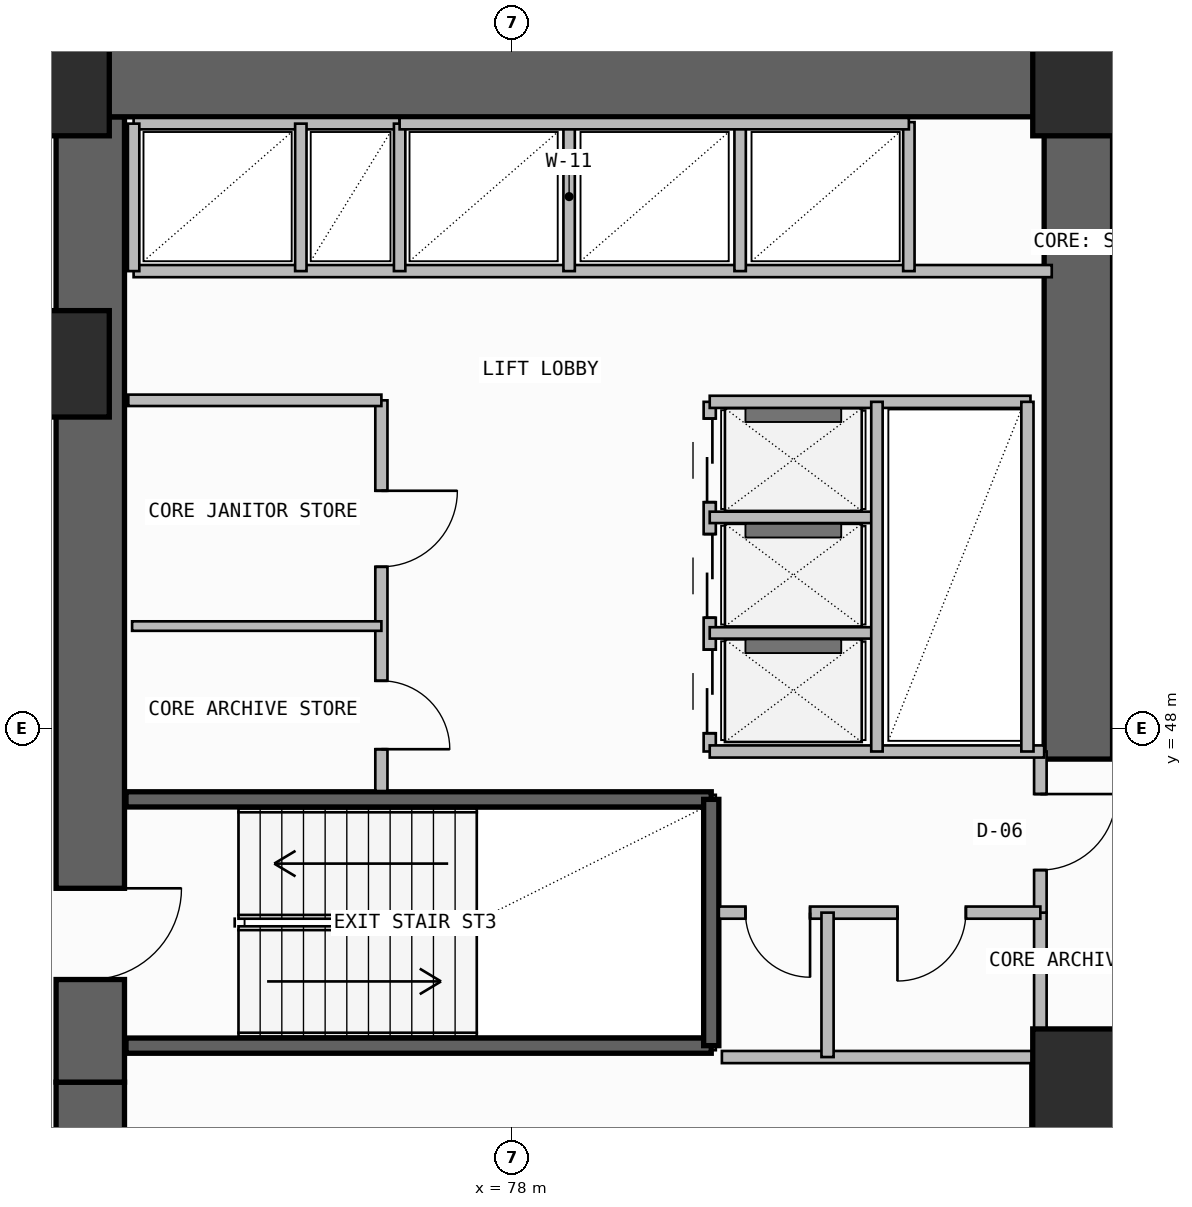
"""IFC4 building model, lengths in metres.
Left out: names, types, materials, properties, quantities, classifications, styles, units other than length and angle.
Written with IfcOpenShell. Run it as: python <this file> out.ifc"""

import sys

from ifc_helpers import new_model, si_unit, direction, frame, frame_2d, origin, origin_2d, place, context, subcontext, project, spatial, rectangle, extrude, element, fill, save


model = new_model("IFC4")
c1 = context("Model", 3, precision=1e-05, world=origin(), true_north=direction((0.0, 1.0)))
c2 = subcontext(c1, "Body", "Model", "MODEL_VIEW")
j1 = project(units=[si_unit("LENGTHUNIT", "METRE"), si_unit("PLANEANGLEUNIT", "RADIAN")], contexts=[c1])
p1 = place(None, origin())
s1 = spatial("IfcSite", under=j1, at=p1, CompositionType="ELEMENT")
p2 = place(p1, origin())
s2 = spatial("IfcBuilding", under=s1, at=p2, CompositionType="ELEMENT")
p3 = place(p2, frame((0.0, 0.0, 128.1)))
s3 = spatial("IfcBuildingStorey", under=s2, at=p3, CompositionType="ELEMENT", Elevation=128.1)
p4 = place(p3, frame((72.45, 35.5, -0.5), z_axis=(0.0, 0.0, 1.0), x_axis=(0.0, 1.0, 0.0)))
e1 = element("IfcWall", 1, at=p4, inside=s3, PredefinedType="SHEAR", context=c2, shape_type="SweptSolid", body=[
    extrude(rectangle(XDim=7.85, YDim=0.9, at=frame_2d((3.925, 0.0))), origin(), (0.0, 0.0, 1.0), 4.3),
])
p5 = place(p4, frame((1.45, 0.0, 0.5)))
e2 = element("IfcOpeningElement", 2, at=p5, cuts=e1, PredefinedType="OPENING", context=c2, shape_type="SweptSolid", body=[
    extrude(rectangle(XDim=1.2, YDim=2.2, at=frame_2d((0.6, 1.1))), frame((0.0, 0.46, 0.0), z_axis=(0.0, -1.0, 0.0), x_axis=(1.0, 0.0, 0.0)), (0.0, 0.0, 1.0), 0.92),
])
p6 = place(p3, frame((72.45, 43.35, -0.5), z_axis=(0.0, 0.0, 1.0), x_axis=(0.0, 1.0, 0.0)))
e3 = element("IfcWall", 3, at=p6, inside=s3, PredefinedType="SHEAR", context=c2, shape_type="SweptSolid", body=[
    extrude(rectangle(XDim=12.7, YDim=0.9, at=frame_2d((6.35, 0.0))), origin(), (0.0, 0.0, 1.0), 4.3),
])
p7 = place(p6, frame((1.35, 0.0, 0.5)))
e4 = element("IfcOpeningElement", 4, at=p7, cuts=e3, PredefinedType="OPENING", context=c2, shape_type="SweptSolid", body=[
    extrude(rectangle(XDim=1.2, YDim=2.2, at=frame_2d((0.6, 1.1))), frame((0.0, 0.46, 0.0), z_axis=(0.0, -1.0, 0.0), x_axis=(1.0, 0.0, 0.0)), (0.0, 0.0, 1.0), 0.92),
])
p8 = place(p3, frame((72.0, 56.5, -0.5), z_axis=(0.0, 0.0, 1.0), x_axis=(1.0, 0.0, 0.0)))
e5 = element("IfcWall", 5, at=p8, inside=s3, PredefinedType="SHEAR", context=c2, shape_type="SweptSolid", body=[
    extrude(rectangle(XDim=13.9, YDim=0.9, at=frame_2d((6.95, 0.0))), origin(), (0.0, 0.0, 1.0), 4.3),
])
p9 = place(p3, frame((85.45, 47.6, -0.5), z_axis=(0.0, 0.0, 1.0), x_axis=(0.0, 1.0, 0.0)))
e6 = element("IfcWall", 6, at=p9, inside=s3, PredefinedType="SHEAR", context=c2, shape_type="SweptSolid", body=[
    extrude(rectangle(XDim=8.45, YDim=0.9, at=frame_2d((4.225, 0.0))), origin(), (0.0, 0.0, 1.0), 4.3),
])
for number, where, z_axis, x_axis in (
    (7, (85.55, 43.35, 0.0), (0.0, 0.0, 1.0), (1.0, 0.0, 0.0)),
    (8, (72.0, 52.8, 0.0), (0.0, 0.0, 1.0), (1.0, 0.0, 0.0)),
    (9, (72.0, 56.5, 0.0), (0.0, 0.0, 1.0), (1.0, 0.0, 0.0)),
    (10, (85.55, 56.5, 0.0), (0.0, 0.0, 1.0), (1.0, 0.0, 0.0)),
):
    element("IfcColumn", number, at=place(p3, frame(where, z_axis=z_axis, x_axis=x_axis)), inside=s3, PredefinedType="COLUMN", context=c2, shape_type="SweptSolid", body=[
        extrude(rectangle(XDim=1.4, YDim=1.4, at=origin_2d()), origin(), (0.0, 0.0, 1.0), 4.2),
    ])
p10 = place(p3, frame((84.92, 38.85, 0.0), z_axis=(0.0, 0.0, 1.0), x_axis=(0.0, 1.0, 0.0)))
e11 = element("IfcWall", 11, at=p10, inside=s3, PredefinedType="SOLIDWALL", context=c2, shape_type="SweptSolid", body=[
    extrude(rectangle(XDim=4.83, YDim=0.2, at=frame_2d((2.415, 0.0))), origin(), (0.0, 0.0, 1.0), 3.8),
])
p11 = place(p10, frame((1.25, 0.0, 0.0)))
e12 = element("IfcOpeningElement", 12, at=p11, cuts=e11, PredefinedType="OPENING", context=c2, shape_type="SweptSolid", body=[
    extrude(rectangle(XDim=1.1, YDim=2.2, at=frame_2d((0.55, 1.1))), frame((0.0, 0.11, 0.0), z_axis=(0.0, -1.0, 0.0), x_axis=(1.0, 0.0, 0.0)), (0.0, 0.0, 1.0), 0.22),
])
for number, where, z_axis, x_axis in (
    (13, (72.92, 43.83, -0.5), (0.0, 0.0, 1.0), (1.0, 0.0, 0.0)),
    (14, (72.92, 47.07, -0.5), (0.0, 0.0, 1.0), (1.0, 0.0, 0.0)),
):
    element("IfcWall", number, at=place(p3, frame(where, z_axis=z_axis, x_axis=x_axis)), inside=s3, PredefinedType="SOLIDWALL", context=c2, shape_type="SweptSolid", body=[
        extrude(rectangle(XDim=7.7, YDim=0.2, at=frame_2d((3.85, 0.0))), origin(), (0.0, 0.0, 1.0), 4.3),
    ])
p12 = place(p3, frame((80.62, 43.83, -0.5), z_axis=(0.0, 0.0, 1.0), x_axis=(0.0, 1.0, 0.0)))
e15 = element("IfcWall", 15, at=p12, inside=s3, PredefinedType="SOLIDWALL", context=c2, shape_type="SweptSolid", body=[
    extrude(rectangle(XDim=3.24, YDim=0.2, at=frame_2d((1.62, 0.0))), origin(), (0.0, 0.0, 1.0), 4.3),
])
p13 = place(p3, frame((84.95, 43.68, 0.0), z_axis=(0.0, 0.0, 1.0), x_axis=(0.0, 1.0, 0.0)))
e16 = element("IfcWall", 16, at=p13, inside=s3, PredefinedType="PLUMBINGWALL", context=c2, shape_type="SweptSolid", body=[
    extrude(rectangle(XDim=1.9, YDim=0.165, at=frame_2d((0.95, 0.0))), origin(), (0.0, 0.0, 1.0), 3.8),
])
p14 = place(p3, frame((84.95, 45.58, 0.0), z_axis=(0.0, 0.0, 1.0), x_axis=(0.0, 1.0, 0.0)))
e17 = element("IfcWall", 17, at=p14, inside=s3, PredefinedType="PARTITIONING", context=c2, shape_type="SweptSolid", body=[
    extrude(rectangle(XDim=2.12, YDim=0.165, at=frame_2d((1.06, 0.0))), origin(), (0.0, 0.0, 1.0), 3.8),
])
p15 = place(p14, frame((0.56, 0.0, 0.0)))
e18 = element("IfcOpeningElement", 18, at=p15, cuts=e17, PredefinedType="OPENING", context=c2, shape_type="SweptSolid", body=[
    extrude(rectangle(XDim=1.0, YDim=2.2, at=frame_2d((0.5, 1.1))), frame((0.0, 0.093, 0.0), z_axis=(0.0, -1.0, 0.0), x_axis=(1.0, 0.0, 0.0)), (0.0, 0.0, 1.0), 0.185),
])
p16 = place(p3, frame((80.72, 45.58, 0.0), z_axis=(0.0, 0.0, 1.0), x_axis=(1.0, 0.0, 0.0)))
e19 = element("IfcWall", 19, at=p16, inside=s3, PredefinedType="PLUMBINGWALL", context=c2, shape_type="SweptSolid", body=[
    extrude(rectangle(XDim=4.23, YDim=0.16, at=frame_2d((2.115, 0.0))), origin(), (0.0, 0.0, 1.0), 3.8),
])
p17 = place(p16, frame((0.35, 0.0, 0.0)))
e20 = element("IfcOpeningElement", 20, at=p17, cuts=e19, PredefinedType="OPENING", context=c2, shape_type="SweptSolid", body=[
    extrude(rectangle(XDim=0.85, YDim=2.05, at=frame_2d((0.425, 1.025))), frame((0.0, 0.09, 0.0), z_axis=(0.0, -1.0, 0.0), x_axis=(1.0, 0.0, 0.0)), (0.0, 0.0, 1.0), 0.18),
])
p18 = place(p16, frame((2.35, 0.0, 0.0)))
e21 = element("IfcOpeningElement", 21, at=p18, cuts=e19, PredefinedType="OPENING", context=c2, shape_type="SweptSolid", body=[
    extrude(rectangle(XDim=0.9, YDim=2.1, at=frame_2d((0.45, 1.05))), frame((0.0, 0.09, 0.0), z_axis=(0.0, -1.0, 0.0), x_axis=(1.0, 0.0, 0.0)), (0.0, 0.0, 1.0), 0.18),
])
p19 = place(p3, frame((80.76, 43.68, 0.0), z_axis=(0.0, 0.0, 1.0), x_axis=(1.0, 0.0, 0.0)))
e22 = element("IfcWall", 22, at=p19, inside=s3, PredefinedType="PLUMBINGWALL", context=c2, shape_type="SweptSolid", body=[
    extrude(rectangle(XDim=4.19, YDim=0.16, at=frame_2d((2.095, 0.0))), origin(), (0.0, 0.0, 1.0), 3.8),
])
p20 = place(p3, frame((82.15, 43.68, 0.0), z_axis=(0.0, 0.0, 1.0), x_axis=(0.0, 1.0, 0.0)))
e23 = element("IfcWall", 23, at=p20, inside=s3, PredefinedType="PLUMBINGWALL", context=c2, shape_type="SweptSolid", body=[
    extrude(rectangle(XDim=1.9, YDim=0.16, at=frame_2d((0.95, 0.0))), origin(), (0.0, 0.0, 1.0), 3.8),
])
p21 = place(p3, frame((76.28, 47.18, 0.0), z_axis=(0.0, 0.0, 1.0), x_axis=(0.0, 1.0, 0.0)))
e24 = element("IfcWall", 24, at=p21, inside=s3, PredefinedType="SOLIDWALL", context=c2, shape_type="SweptSolid", body=[
    extrude(rectangle(XDim=5.14, YDim=0.16, at=frame_2d((2.57, 0.0))), origin(), (0.0, 0.0, 1.0), 3.8),
])
p22 = place(p21, frame((0.55, 0.0, 0.0)))
e25 = element("IfcOpeningElement", 25, at=p22, cuts=e24, PredefinedType="OPENING", context=c2, shape_type="SweptSolid", body=[
    extrude(rectangle(XDim=0.9, YDim=2.1, at=frame_2d((0.45, 1.05))), frame((0.0, 0.09, 0.0), z_axis=(0.0, -1.0, 0.0), x_axis=(1.0, 0.0, 0.0)), (0.0, 0.0, 1.0), 0.18),
])
p23 = place(p21, frame((2.95, 0.0, 0.0)))
e26 = element("IfcOpeningElement", 26, at=p23, cuts=e24, PredefinedType="OPENING", context=c2, shape_type="SweptSolid", body=[
    extrude(rectangle(XDim=1.0, YDim=2.2, at=frame_2d((0.5, 1.1))), frame((0.0, 0.09, 0.0), z_axis=(0.0, -1.0, 0.0), x_axis=(1.0, 0.0, 0.0)), (0.0, 0.0, 1.0), 0.18),
])
p24 = place(p3, frame((72.95, 52.32, 0.0), z_axis=(0.0, 0.0, 1.0), x_axis=(1.0, 0.0, 0.0)))
e27 = element("IfcWall", 27, at=p24, inside=s3, PredefinedType="SOLIDWALL", context=c2, shape_type="SweptSolid", body=[
    extrude(rectangle(XDim=3.33, YDim=0.15, at=frame_2d((1.665, 0.0))), origin(), (0.0, 0.0, 1.0), 3.8),
])
p25 = place(p3, frame((73.0, 49.35, 0.0), z_axis=(0.0, 0.0, 1.0), x_axis=(1.0, 0.0, 0.0)))
e28 = element("IfcWall", 28, at=p25, inside=s3, PredefinedType="PARTITIONING", context=c2, shape_type="SweptSolid", body=[
    extrude(rectangle(XDim=3.28, YDim=0.125, at=frame_2d((1.64, 0.0))), origin(), (0.0, 0.0, 1.0), 3.8),
])
p26 = place(p3, frame((80.6, 47.7, 0.0), z_axis=(0.0, 0.0, 1.0), x_axis=(0.0, 1.0, 0.0)))
e29 = element("IfcWall", 29, at=p26, inside=s3, PredefinedType="SOLIDWALL", context=c2, shape_type="SweptSolid", body=[
    extrude(rectangle(XDim=4.6, YDim=0.16, at=frame_2d((2.3, 0.0))), origin(), (0.0, 0.0, 1.0), 3.8),
])
p27 = place(p26, frame((0.24, 0.0, 0.0)))
e30 = element("IfcOpeningElement", 30, at=p27, cuts=e29, PredefinedType="OPENING", context=c2, shape_type="SweptSolid", body=[
    extrude(rectangle(XDim=1.1, YDim=2.25, at=frame_2d((0.55, 1.125))), frame((0.0, 0.09, 0.0), z_axis=(0.0, -1.0, 0.0), x_axis=(1.0, 0.0, 0.0)), (0.0, 0.0, 1.0), 0.18),
])
p28 = place(p26, frame((1.76, 0.0, 0.0)))
e31 = element("IfcOpeningElement", 31, at=p28, cuts=e29, PredefinedType="OPENING", context=c2, shape_type="SweptSolid", body=[
    extrude(rectangle(XDim=1.1, YDim=2.25, at=frame_2d((0.55, 1.125))), frame((0.0, 0.09, 0.0), z_axis=(0.0, -1.0, 0.0), x_axis=(1.0, 0.0, 0.0)), (0.0, 0.0, 1.0), 0.18),
])
p29 = place(p26, frame((3.28, 0.0, 0.0)))
e32 = element("IfcOpeningElement", 32, at=p29, cuts=e29, PredefinedType="OPENING", context=c2, shape_type="SweptSolid", body=[
    extrude(rectangle(XDim=1.1, YDim=2.25, at=frame_2d((0.55, 1.125))), frame((0.0, 0.09, 0.0), z_axis=(0.0, -1.0, 0.0), x_axis=(1.0, 0.0, 0.0)), (0.0, 0.0, 1.0), 0.18),
])
p30 = place(p3, frame((80.6, 47.7, 0.0), z_axis=(0.0, 0.0, 1.0), x_axis=(1.0, 0.0, 0.0)))
e33 = element("IfcWall", 33, at=p30, inside=s3, PredefinedType="SOLIDWALL", context=c2, shape_type="SweptSolid", body=[
    extrude(rectangle(XDim=4.4, YDim=0.16, at=frame_2d((2.2, 0.0))), origin(), (0.0, 0.0, 1.0), 3.8),
])
p31 = place(p3, frame((80.6, 52.3, 0.0), z_axis=(0.0, 0.0, 1.0), x_axis=(1.0, 0.0, 0.0)))
e34 = element("IfcWall", 34, at=p31, inside=s3, PredefinedType="SOLIDWALL", context=c2, shape_type="SweptSolid", body=[
    extrude(rectangle(XDim=4.22, YDim=0.16, at=frame_2d((2.11, 0.0))), origin(), (0.0, 0.0, 1.0), 3.8),
])
for number, where, z_axis, x_axis in (
    (35, (80.6, 49.26, 0.0), (0.0, 0.0, 1.0), (1.0, 0.0, 0.0)),
    (36, (80.6, 50.78, 0.0), (0.0, 0.0, 1.0), (1.0, 0.0, 0.0)),
):
    element("IfcWall", number, at=place(p3, frame(where, z_axis=z_axis, x_axis=x_axis)), inside=s3, PredefinedType="PLUMBINGWALL", context=c2, shape_type="SweptSolid", body=[
        extrude(rectangle(XDim=2.2, YDim=0.15, at=frame_2d((1.1, 0.0))), origin(), (0.0, 0.0, 1.0), 3.8),
    ])
p32 = place(p3, frame((82.8, 47.7, 0.0), z_axis=(0.0, 0.0, 1.0), x_axis=(0.0, 1.0, 0.0)))
e37 = element("IfcWall", 37, at=p32, inside=s3, PredefinedType="PLUMBINGWALL", context=c2, shape_type="SweptSolid", body=[
    extrude(rectangle(XDim=4.6, YDim=0.15, at=frame_2d((2.3, 0.0))), origin(), (0.0, 0.0, 1.0), 3.8),
])
p33 = place(p3, frame((84.78, 47.7, 0.0), z_axis=(0.0, 0.0, 1.0), x_axis=(0.0, 1.0, 0.0)))
e38 = element("IfcWall", 38, at=p33, inside=s3, PredefinedType="SOLIDWALL", context=c2, shape_type="SweptSolid", body=[
    extrude(rectangle(XDim=4.6, YDim=0.16, at=frame_2d((2.3, 0.0))), origin(), (0.0, 0.0, 1.0), 3.8),
])
p34 = place(p3, frame((73.02, 54.02, 0.0), z_axis=(0.0, 0.0, 1.0), x_axis=(1.0, 0.0, 0.0)))
e39 = element("IfcWall", 39, at=p34, inside=s3, PredefinedType="SOLIDWALL", context=c2, shape_type="SweptSolid", body=[
    extrude(rectangle(XDim=12.08, YDim=0.16, at=frame_2d((6.04, 0.0))), origin(), (0.0, 0.0, 1.0), 3.8),
])
p35 = place(p3, frame((73.02, 55.96, 0.0), z_axis=(0.0, 0.0, 1.0), x_axis=(1.0, 0.0, 0.0)))
e40 = element("IfcWall", 40, at=p35, inside=s3, PredefinedType="SOLIDWALL", context=c2, shape_type="SweptSolid", body=[
    extrude(rectangle(XDim=3.5, YDim=0.15, at=frame_2d((1.75, 0.0))), origin(), (0.0, 0.0, 1.0), 3.8),
])
p36 = place(p3, frame((73.02, 54.02, 0.0), z_axis=(0.0, 0.0, 1.0), x_axis=(0.0, 1.0, 0.0)))
e41 = element("IfcWall", 41, at=p36, inside=s3, PredefinedType="PLUMBINGWALL", context=c2, shape_type="SweptSolid", body=[
    extrude(rectangle(XDim=1.94, YDim=0.15, at=frame_2d((0.97, 0.0))), origin(), (0.0, 0.0, 1.0), 3.8),
])
p37 = place(p3, frame((76.52, 54.02, 0.0), z_axis=(0.0, 0.0, 1.0), x_axis=(0.0, 1.0, 0.0)))
e42 = element("IfcWall", 42, at=p37, inside=s3, PredefinedType="SOLIDWALL", context=c2, shape_type="SweptSolid", body=[
    extrude(rectangle(XDim=1.94, YDim=0.15, at=frame_2d((0.97, 0.0))), origin(), (0.0, 0.0, 1.0), 3.8),
])
p38 = place(p3, frame((75.22, 54.02, 0.0), z_axis=(0.0, 0.0, 1.0), x_axis=(0.0, 1.0, 0.0)))
e43 = element("IfcWall", 43, at=p38, inside=s3, PredefinedType="PLUMBINGWALL", context=c2, shape_type="SweptSolid", body=[
    extrude(rectangle(XDim=1.94, YDim=0.15, at=frame_2d((0.97, 0.0))), origin(), (0.0, 0.0, 1.0), 3.8),
])
for number, where, z_axis, x_axis in (
    (44, (78.75, 54.02, 0.0), (0.0, 0.0, 1.0), (0.0, 1.0, 0.0)),
    (45, (81.0, 54.02, 0.0), (0.0, 0.0, 1.0), (0.0, 1.0, 0.0)),
):
    element("IfcWall", number, at=place(p3, frame(where, z_axis=z_axis, x_axis=x_axis)), inside=s3, PredefinedType="PLUMBINGWALL", context=c2, shape_type="SweptSolid", body=[
        extrude(rectangle(XDim=1.96, YDim=0.15, at=frame_2d((0.98, 0.0))), origin(), (0.0, 0.0, 1.0), 3.8),
    ])
p39 = place(p3, frame((83.22, 54.02, 0.0), z_axis=(0.0, 0.0, 1.0), x_axis=(0.0, 1.0, 0.0)))
e46 = element("IfcWall", 46, at=p39, inside=s3, PredefinedType="SOLIDWALL", context=c2, shape_type="SweptSolid", body=[
    extrude(rectangle(XDim=1.96, YDim=0.15, at=frame_2d((0.98, 0.0))), origin(), (0.0, 0.0, 1.0), 3.8),
])
p40 = place(p3, frame((76.52, 55.96, 0.0), z_axis=(0.0, 0.0, 1.0), x_axis=(1.0, 0.0, 0.0)))
e47 = element("IfcWall", 47, at=p40, inside=s3, PredefinedType="SOLIDWALL", context=c2, shape_type="SweptSolid", body=[
    extrude(rectangle(XDim=6.7, YDim=0.15, at=frame_2d((3.35, 0.0))), origin(), (0.0, 0.0, 1.0), 3.8),
])
p41 = place(p7, frame((1.2, 0.0, 0.0), z_axis=(0.0, 0.0, 1.0), x_axis=(-1.0, 0.0, 0.0)))
e48 = element("IfcDoor", 48, at=p41, inside=s3, OperationType="SINGLE_SWING_LEFT", PredefinedType="USERDEFINED", context=c2, shape_type="SweptSolid", body=[
    extrude(rectangle(XDim=1.2, YDim=2.2, at=frame_2d((0.6, 1.1))), frame((0.0, 0.025, 0.0), z_axis=(0.0, -1.0, 0.0), x_axis=(1.0, 0.0, 0.0)), (0.0, 0.0, 1.0), 0.05),
])
fill(e4, e48)
p42 = place(p15, frame((1.0, 0.0, 0.0), z_axis=(0.0, 0.0, 1.0), x_axis=(-1.0, 0.0, 0.0)))
e49 = element("IfcDoor", 49, at=p42, inside=s3, OperationType="SINGLE_SWING_LEFT", PredefinedType="DOOR", context=c2, shape_type="SweptSolid", body=[
    extrude(rectangle(XDim=1.0, YDim=2.2, at=frame_2d((0.5, 1.1))), frame((0.0, 0.025, 0.0), z_axis=(0.0, -1.0, 0.0), x_axis=(1.0, 0.0, 0.0)), (0.0, 0.0, 1.0), 0.05),
])
fill(e18, e49)
p43 = place(p17, frame((0.85, 0.0, 0.0), z_axis=(0.0, 0.0, 1.0), x_axis=(-1.0, 0.0, 0.0)))
e50 = element("IfcDoor", 50, at=p43, inside=s3, OperationType="SINGLE_SWING_LEFT", PredefinedType="DOOR", context=c2, shape_type="SweptSolid", body=[
    extrude(rectangle(XDim=0.85, YDim=2.05, at=frame_2d((0.425, 1.025))), frame((0.0, 0.025, 0.0), z_axis=(0.0, -1.0, 0.0), x_axis=(1.0, 0.0, 0.0)), (0.0, 0.0, 1.0), 0.05),
])
fill(e20, e50)
p44 = place(p18, frame((0.9, 0.0, 0.0), z_axis=(0.0, 0.0, 1.0), x_axis=(-1.0, 0.0, 0.0)))
e51 = element("IfcDoor", 51, at=p44, inside=s3, OperationType="SINGLE_SWING_RIGHT", PredefinedType="DOOR", context=c2, shape_type="SweptSolid", body=[
    extrude(rectangle(XDim=0.9, YDim=2.1, at=frame_2d((0.45, 1.05))), frame((0.0, 0.025, 0.0), z_axis=(0.0, -1.0, 0.0), x_axis=(1.0, 0.0, 0.0)), (0.0, 0.0, 1.0), 0.05),
])
fill(e21, e51)
p45 = place(p22, frame((0.9, 0.0, 0.0), z_axis=(0.0, 0.0, 1.0), x_axis=(-1.0, 0.0, 0.0)))
e52 = element("IfcDoor", 52, at=p45, inside=s3, OperationType="SINGLE_SWING_RIGHT", PredefinedType="DOOR", context=c2, shape_type="SweptSolid", body=[
    extrude(rectangle(XDim=0.9, YDim=2.1, at=frame_2d((0.45, 1.05))), frame((0.0, 0.025, 0.0), z_axis=(0.0, -1.0, 0.0), x_axis=(1.0, 0.0, 0.0)), (0.0, 0.0, 1.0), 0.05),
])
fill(e25, e52)
p46 = place(p23, frame((1.0, 0.0, 0.0), z_axis=(0.0, 0.0, 1.0), x_axis=(-1.0, 0.0, 0.0)))
e53 = element("IfcDoor", 53, at=p46, inside=s3, OperationType="SINGLE_SWING_LEFT", PredefinedType="DOOR", context=c2, shape_type="SweptSolid", body=[
    extrude(rectangle(XDim=1.0, YDim=2.2, at=frame_2d((0.5, 1.1))), frame((0.0, 0.025, 0.0), z_axis=(0.0, -1.0, 0.0), x_axis=(1.0, 0.0, 0.0)), (0.0, 0.0, 1.0), 0.05),
])
fill(e26, e53)
p47 = place(p27, frame((1.1, 0.0, 0.0), z_axis=(0.0, 0.0, 1.0), x_axis=(-1.0, 0.0, 0.0)))
e54 = element("IfcDoor", 54, at=p47, inside=s3, OperationType="DOUBLE_DOOR_SLIDING", PredefinedType="DOOR", context=c2, shape_type="SweptSolid", body=[
    extrude(rectangle(XDim=1.1, YDim=2.25, at=frame_2d((0.55, 1.125))), frame((0.0, 0.025, 0.0), z_axis=(0.0, -1.0, 0.0), x_axis=(1.0, 0.0, 0.0)), (0.0, 0.0, 1.0), 0.05),
])
fill(e30, e54)
p48 = place(p28, frame((1.1, 0.0, 0.0), z_axis=(0.0, 0.0, 1.0), x_axis=(-1.0, 0.0, 0.0)))
e55 = element("IfcDoor", 55, at=p48, inside=s3, OperationType="DOUBLE_DOOR_SLIDING", PredefinedType="DOOR", context=c2, shape_type="SweptSolid", body=[
    extrude(rectangle(XDim=1.1, YDim=2.25, at=frame_2d((0.55, 1.125))), frame((0.0, 0.025, 0.0), z_axis=(0.0, -1.0, 0.0), x_axis=(1.0, 0.0, 0.0)), (0.0, 0.0, 1.0), 0.05),
])
fill(e31, e55)
p49 = place(p29, frame((1.1, 0.0, 0.0), z_axis=(0.0, 0.0, 1.0), x_axis=(-1.0, 0.0, 0.0)))
e56 = element("IfcDoor", 56, at=p49, inside=s3, OperationType="DOUBLE_DOOR_SLIDING", PredefinedType="DOOR", context=c2, shape_type="SweptSolid", body=[
    extrude(rectangle(XDim=1.1, YDim=2.25, at=frame_2d((0.55, 1.125))), frame((0.0, 0.025, 0.0), z_axis=(0.0, -1.0, 0.0), x_axis=(1.0, 0.0, 0.0)), (0.0, 0.0, 1.0), 0.05),
])
fill(e32, e56)
save(model, sys.argv[1])
